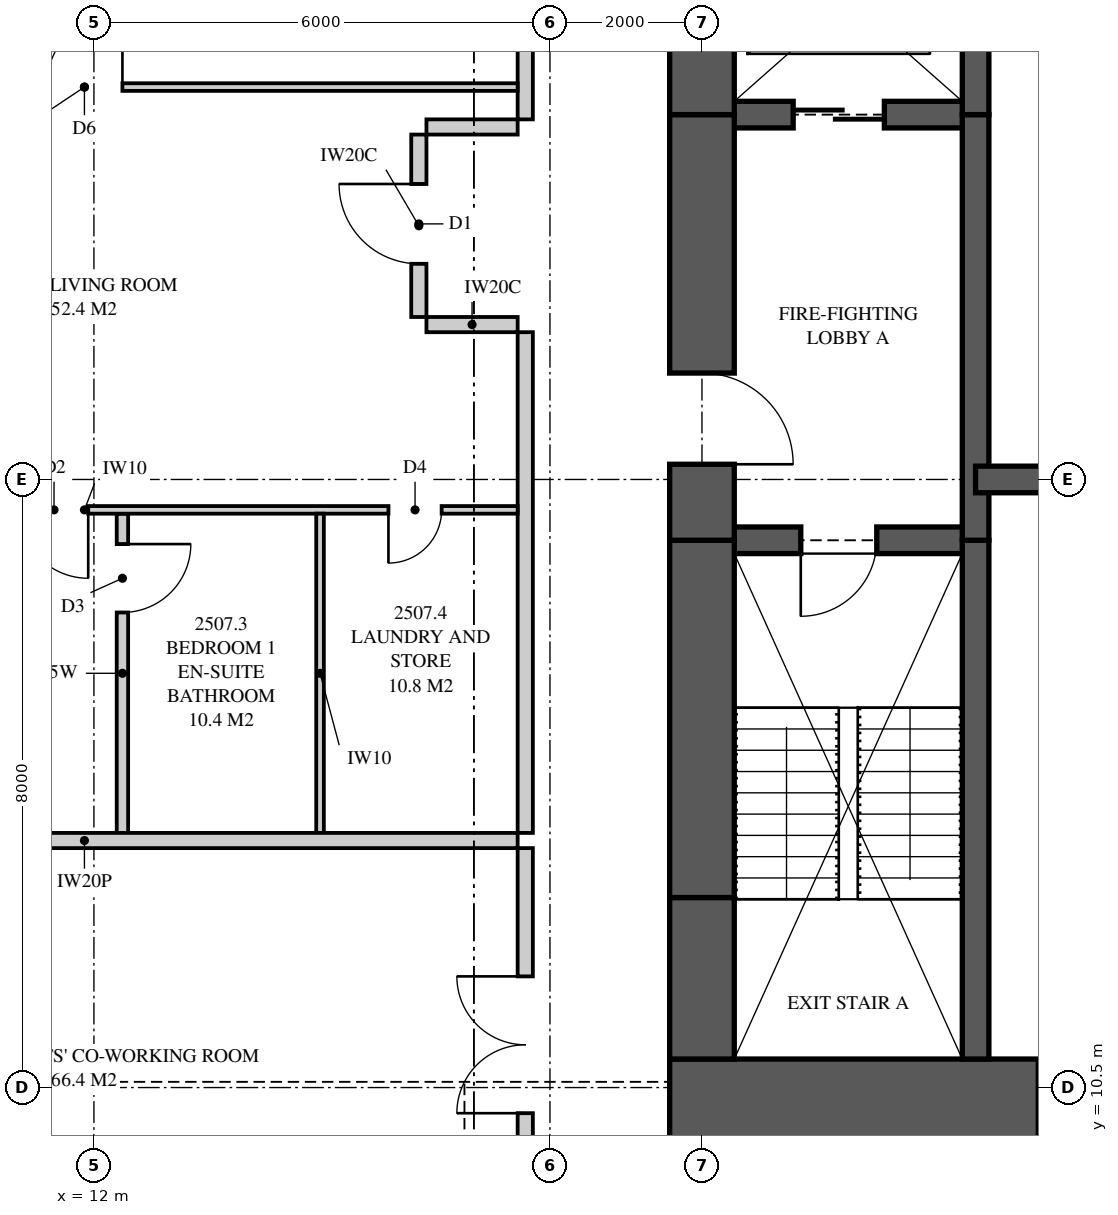
"""IFC4 building model, lengths in metres.
Left out: names, types, materials, properties, quantities, classifications, styles, units other than length and angle.
Written with IfcOpenShell. Run it as: python <this file> out.ifc"""

import sys

from ifc_helpers import new_model, si_unit, direction, frame, frame_2d, origin, place, context, subcontext, project, spatial, polyline, rectangle, outline, extrude, element, fill, save


model = new_model("IFC4")
c1 = context("Model", 3, precision=1e-05, world=origin(), true_north=direction((0.0, 1.0)))
c2 = subcontext(c1, "Body", "Model", "MODEL_VIEW")
j1 = project(units=[si_unit("LENGTHUNIT", "METRE"), si_unit("PLANEANGLEUNIT", "RADIAN")], contexts=[c1])
p1 = place(None, origin())
s1 = spatial("IfcSite", under=j1, at=p1, CompositionType="ELEMENT")
p2 = place(p1, origin())
s2 = spatial("IfcBuilding", under=s1, at=p2, CompositionType="ELEMENT")
p3 = place(p2, frame((0.0, 0.0, 94.8)))
s3 = spatial("IfcBuildingStorey", under=s2, at=p3, CompositionType="ELEMENT", Elevation=94.8)
p4 = place(p3, frame((19.575, 10.125, 0.0), z_axis=(0.0, 0.0, 1.0), x_axis=(1.0, 0.0, 0.0)))
e1 = element("IfcWall", 1, at=p4, inside=s3, PredefinedType="SHEAR", context=c2, shape_type="SweptSolid", body=[
    extrude(rectangle(XDim=6.425, YDim=1.5, at=frame_2d((3.212, 0.0))), origin(), (0.0, 0.0, 1.0), 3.35),
])
p5 = place(p4, frame((4.85, 0.0, 0.0)))
e2 = element("IfcOpeningElement", 2, at=p5, cuts=e1, PredefinedType="OPENING", context=c2, shape_type="SweptSolid", body=[
    extrude(rectangle(XDim=0.75, YDim=2.1, at=frame_2d((0.375, 1.05))), frame((0.0, 0.76, 0.0), z_axis=(0.0, -1.0, 0.0), x_axis=(1.0, 0.0, 0.0)), (0.0, 0.0, 1.0), 1.52),
])
p6 = place(p3, frame((20.0, 26.125, 0.0), z_axis=(0.0, 0.0, 1.0), x_axis=(0.0, -1.0, 0.0)))
e3 = element("IfcWall", 3, at=p6, inside=s3, PredefinedType="SHEAR", context=c2, shape_type="SweptSolid", body=[
    extrude(rectangle(XDim=2.825, YDim=0.85, at=frame_2d((1.413, 0.0))), origin(), (0.0, 0.0, 1.0), 3.35),
])
p7 = place(p3, frame((20.0, 23.3, 0.0), z_axis=(0.0, 0.0, 1.0), x_axis=(0.0, -1.0, 0.0)))
e4 = element("IfcWall", 4, at=p7, inside=s3, PredefinedType="SHEAR", context=c2, shape_type="SweptSolid", body=[
    extrude(rectangle(XDim=5.6, YDim=0.85, at=frame_2d((2.8, 0.0))), origin(), (0.0, 0.0, 1.0), 3.35),
])
p8 = place(p7, frame((3.4, 0.0, 0.0)))
e5 = element("IfcOpeningElement", 5, at=p8, cuts=e4, PredefinedType="OPENING", context=c2, shape_type="SweptSolid", body=[
    extrude(rectangle(XDim=1.2, YDim=2.2, at=frame_2d((0.6, 1.1))), frame((0.0, 0.435, 0.0), z_axis=(0.0, -1.0, 0.0), x_axis=(1.0, 0.0, 0.0)), (0.0, 0.0, 1.0), 0.87),
])
p9 = place(p3, frame((20.0, 17.7, 0.0), z_axis=(0.0, 0.0, 1.0), x_axis=(0.0, -1.0, 0.0)))
e6 = element("IfcWall", 6, at=p9, inside=s3, PredefinedType="SHEAR", context=c2, shape_type="SweptSolid", body=[
    extrude(rectangle(XDim=4.7, YDim=0.85, at=frame_2d((2.35, 0.0))), origin(), (0.0, 0.0, 1.0), 3.35),
])
p10 = place(p3, frame((20.0, 13.0, 0.0), z_axis=(0.0, 0.0, 1.0), x_axis=(0.0, -1.0, 0.0)))
e7 = element("IfcWall", 7, at=p10, inside=s3, PredefinedType="SHEAR", context=c2, shape_type="SweptSolid", body=[
    extrude(rectangle(XDim=2.125, YDim=0.85, at=frame_2d((1.062, 0.0))), origin(), (0.0, 0.0, 1.0), 3.35),
])
p11 = place(p3, frame((23.6, 10.875, 0.0), z_axis=(0.0, 0.0, 1.0), x_axis=(0.0, 1.0, 0.0)))
e8 = element("IfcWall", 8, at=p11, inside=s3, PredefinedType="SHEAR", context=c2, shape_type="SweptSolid", body=[
    extrude(rectangle(XDim=6.825, YDim=0.35, at=frame_2d((3.413, 0.0))), origin(), (0.0, 0.0, 1.0), 3.35),
])
p12 = place(p3, frame((23.6, 17.7, 0.0), z_axis=(0.0, 0.0, 1.0), x_axis=(0.0, 1.0, 0.0)))
e9 = element("IfcWall", 9, at=p12, inside=s3, PredefinedType="SHEAR", context=c2, shape_type="SweptSolid", body=[
    extrude(rectangle(XDim=5.6, YDim=0.35, at=frame_2d((2.8, 0.0))), origin(), (0.0, 0.0, 1.0), 3.35),
])
p13 = place(p3, frame((23.6, 23.3, 0.0), z_axis=(0.0, 0.0, 1.0), x_axis=(0.0, 1.0, 0.0)))
e10 = element("IfcWall", 10, at=p13, inside=s3, PredefinedType="SHEAR", context=c2, shape_type="SweptSolid", body=[
    extrude(rectangle(XDim=2.825, YDim=0.35, at=frame_2d((1.413, 0.0))), origin(), (0.0, 0.0, 1.0), 3.35),
])
p14 = place(p3, frame((20.0, 17.7, 0.0), z_axis=(0.0, 0.0, 1.0), x_axis=(1.0, 0.0, 0.0)))
e11 = element("IfcWall", 11, at=p14, inside=s3, PredefinedType="SHEAR", context=c2, shape_type="SweptSolid", body=[
    extrude(rectangle(XDim=3.6, YDim=0.35, at=frame_2d((1.8, 0.0))), origin(), (0.0, 0.0, 1.0), 3.35),
])
p15 = place(p14, frame((1.3, 0.0, 0.0)))
e12 = element("IfcOpeningElement", 12, at=p15, cuts=e11, PredefinedType="OPENING", context=c2, shape_type="SweptSolid", body=[
    extrude(rectangle(XDim=1.0, YDim=2.1, at=frame_2d((0.5, 1.05))), frame((0.0, 0.185, 0.0), z_axis=(0.0, -1.0, 0.0), x_axis=(1.0, 0.0, 0.0)), (0.0, 0.0, 1.0), 0.37),
])
p16 = place(p3, frame((20.0, 23.3, 0.0), z_axis=(0.0, 0.0, 1.0), x_axis=(1.0, 0.0, 0.0)))
e13 = element("IfcWall", 13, at=p16, inside=s3, PredefinedType="SHEAR", context=c2, shape_type="SweptSolid", body=[
    extrude(rectangle(XDim=3.6, YDim=0.35, at=frame_2d((1.8, 0.0))), origin(), (0.0, 0.0, 1.0), 3.35),
])
p17 = place(p16, frame((1.2, 0.0, 0.0)))
e14 = element("IfcOpeningElement", 14, at=p17, cuts=e13, PredefinedType="OPENING", context=c2, shape_type="SweptSolid", body=[
    extrude(rectangle(XDim=1.2, YDim=2.1, at=frame_2d((0.6, 1.05))), frame((0.0, 0.185, 0.0), z_axis=(0.0, -1.0, 0.0), x_axis=(1.0, 0.0, 0.0)), (0.0, 0.0, 1.0), 0.37),
])
p18 = place(p3, frame((23.6, 18.5, 0.0), z_axis=(0.0, 0.0, 1.0), x_axis=(1.0, 0.0, 0.0)))
e15 = element("IfcWall", 15, at=p18, inside=s3, PredefinedType="SHEAR", context=c2, shape_type="SweptSolid", body=[
    extrude(rectangle(XDim=2.4, YDim=0.35, at=frame_2d((1.2, 0.0))), origin(), (0.0, 0.0, 1.0), 3.35),
])
p19 = place(p3, frame((6.175, 13.75, 0.0), z_axis=(0.0, 0.0, 1.0), x_axis=(1.0, 0.0, 0.0)))
e16 = element("IfcWall", 16, at=p19, inside=s3, PredefinedType="PARTITIONING", context=c2, shape_type="SweptSolid", body=[
    extrude(outline(polyline([(1.685, 2.15), (0.0, 2.15), (0.0, 0.0), (11.4, 0.0), (11.4, 3.11), (5.335, 3.11), (5.335, 2.51), (2.715, 2.51), (2.715, 3.11), (1.685, 3.11), (1.685, 2.15)]), holes=[polyline([(1.021, 0.133), (0.529, 0.133), (0.529, 0.991), (1.021, 0.991), (1.021, 0.133)]), polyline([(1.021, 1.158), (0.529, 1.158), (0.529, 2.017), (1.021, 2.017), (1.021, 1.158)])]), frame((0.0, 0.1, 0.0), z_axis=(0.0, -1.0, 0.0), x_axis=(1.0, 0.0, 0.0)), (0.0, 0.0, 1.0), 0.2),
])
p20 = place(p3, frame((17.675, 7.825, 0.0), z_axis=(0.0, 0.0, 1.0), x_axis=(0.0, 1.0, 0.0)))
e17 = element("IfcWall", 17, at=p20, inside=s3, PredefinedType="PARTITIONING", context=c2, shape_type="SweptSolid", body=[
    extrude(outline(polyline([(0.0, 0.0), (5.825, 0.0), (5.825, 3.11), (3.087, 3.11), (3.087, 2.541), (2.413, 2.541), (2.413, 3.11), (0.0, 3.11), (0.0, 0.0)])), frame((0.0, 0.1, 0.0), z_axis=(0.0, -1.0, 0.0), x_axis=(1.0, 0.0, 0.0)), (0.0, 0.0, 1.0), 0.2),
])
p21 = place(p20, frame((2.337, 0.0, 0.0)))
e18 = element("IfcOpeningElement", 18, at=p21, cuts=e17, PredefinedType="OPENING", context=c2, shape_type="SweptSolid", body=[
    extrude(rectangle(XDim=1.8, YDim=2.1, at=frame_2d((0.9, 1.05))), frame((0.0, 0.11, 0.0), z_axis=(0.0, -1.0, 0.0), x_axis=(1.0, 0.0, 0.0)), (0.0, 0.0, 1.0), 0.22),
])
p22 = place(p3, frame((17.675, 13.85, 0.0), z_axis=(0.0, 0.0, 1.0), x_axis=(0.0, 1.0, 0.0)))
e19 = element("IfcWall", 19, at=p22, inside=s3, PredefinedType="PARTITIONING", context=c2, shape_type="SweptSolid", body=[
    extrude(rectangle(XDim=6.587, YDim=0.2, at=frame_2d((3.294, 0.0))), origin(), (0.0, 0.0, 1.0), 3.11),
])
p23 = place(p3, frame((6.175, 18.1, 0.0), z_axis=(0.0, 0.0, 1.0), x_axis=(1.0, 0.0, 0.0)))
e20 = element("IfcWall", 20, at=p23, inside=s3, PredefinedType="PARTITIONING", context=c2, shape_type="SweptSolid", body=[
    extrude(outline(polyline([(0.0, 0.0), (11.4, 0.0), (11.4, 3.11), (5.285, 3.11), (5.285, 2.51), (2.765, 2.51), (2.765, 3.11), (1.635, 3.11), (1.635, 2.15), (0.0, 2.15), (0.0, 3.11), (0.0, 0.0)])), frame((0.0, 0.05, 0.0), z_axis=(0.0, -1.0, 0.0), x_axis=(1.0, 0.0, 0.0)), (0.0, 0.0, 1.0), 0.1),
])
p24 = place(p23, frame((4.85, 0.0, 0.0)))
e21 = element("IfcOpeningElement", 21, at=p24, cuts=e20, PredefinedType="OPENING", context=c2, shape_type="SweptSolid", body=[
    extrude(rectangle(XDim=0.9, YDim=2.1, at=frame_2d((0.45, 1.05))), frame((0.0, 0.06, 0.0), z_axis=(0.0, -1.0, 0.0), x_axis=(1.0, 0.0, 0.0)), (0.0, 0.0, 1.0), 0.12),
])
p25 = place(p23, frame((9.7, 0.0, 0.0)))
e22 = element("IfcOpeningElement", 22, at=p25, cuts=e20, PredefinedType="OPENING", context=c2, shape_type="SweptSolid", body=[
    extrude(rectangle(XDim=0.7, YDim=2.1, at=frame_2d((0.35, 1.05))), frame((0.0, 0.06, 0.0), z_axis=(0.0, -1.0, 0.0), x_axis=(1.0, 0.0, 0.0)), (0.0, 0.0, 1.0), 0.12),
])
p26 = place(p3, frame((12.375, 13.85, 0.0), z_axis=(0.0, 0.0, 1.0), x_axis=(0.0, 1.0, 0.0)))
e23 = element("IfcWall", 23, at=p26, inside=s3, PredefinedType="PLUMBINGWALL", context=c2, shape_type="SweptSolid", body=[
    extrude(rectangle(XDim=4.2, YDim=0.15, at=frame_2d((2.1, 0.0))), origin(), (0.0, 0.0, 1.0), 3.11),
])
p27 = place(p26, frame((2.9, 0.0, 0.0)))
e24 = element("IfcOpeningElement", 24, at=p27, cuts=e23, PredefinedType="OPENING", context=c2, shape_type="SweptSolid", body=[
    extrude(rectangle(XDim=0.9, YDim=2.1, at=frame_2d((0.45, 1.05))), frame((0.0, 0.085, 0.0), z_axis=(0.0, -1.0, 0.0), x_axis=(1.0, 0.0, 0.0)), (0.0, 0.0, 1.0), 0.17),
])
p28 = place(p3, frame((14.975, 13.85, 0.0), z_axis=(0.0, 0.0, 1.0), x_axis=(0.0, 1.0, 0.0)))
e25 = element("IfcWall", 25, at=p28, inside=s3, PredefinedType="PARTITIONING", context=c2, shape_type="SweptSolid", body=[
    extrude(rectangle(XDim=4.2, YDim=0.1, at=frame_2d((2.1, 0.0))), origin(), (0.0, 0.0, 1.0), 3.11),
])
p29 = place(p3, frame((6.175, 23.663, 0.0), z_axis=(0.0, 0.0, 1.0), x_axis=(1.0, 0.0, 0.0)))
e26 = element("IfcWall", 26, at=p29, inside=s3, PredefinedType="PARTITIONING", context=c2, shape_type="SweptSolid", body=[
    extrude(outline(polyline([(0.529, 2.15), (0.0, 2.15), (0.0, 0.0), (0.529, 0.0), (0.529, 0.555), (1.021, 0.555), (1.021, 0.0), (11.4, 0.0), (11.4, 3.11), (5.285, 3.11), (5.285, 2.51), (2.765, 2.51), (2.765, 3.11), (1.635, 3.11), (1.635, 2.15), (1.021, 2.15), (1.021, 1.594), (0.529, 1.594), (0.529, 2.15)])), frame((0.0, 0.05, 0.0), z_axis=(0.0, -1.0, 0.0), x_axis=(1.0, 0.0, 0.0)), (0.0, 0.0, 1.0), 0.1),
])
p30 = place(p29, frame((5.2, 0.0, 0.0)))
e27 = element("IfcOpeningElement", 27, at=p30, cuts=e26, PredefinedType="OPENING", context=c2, shape_type="SweptSolid", body=[
    extrude(rectangle(XDim=1.0, YDim=2.1, at=frame_2d((0.5, 1.05))), frame((0.0, 0.06, 0.0), z_axis=(0.0, -1.0, 0.0), x_axis=(1.0, 0.0, 0.0)), (0.0, 0.0, 1.0), 0.12),
])
p31 = place(p3, frame((17.675, 23.238, 0.0), z_axis=(0.0, 0.0, 1.0), x_axis=(0.0, 1.0, 0.0)))
e28 = element("IfcWall", 28, at=p31, inside=s3, PredefinedType="PARTITIONING", context=c2, shape_type="SweptSolid", body=[
    extrude(outline(polyline([(0.0, 0.0), (5.938, 0.0), (5.938, 3.11), (3.525, 3.11), (3.525, 2.541), (2.85, 2.541), (2.85, 3.11), (0.0, 3.11), (0.0, 0.0)])), frame((0.0, 0.1, 0.0), z_axis=(0.0, -1.0, 0.0), x_axis=(1.0, 0.0, 0.0)), (0.0, 0.0, 1.0), 0.2),
])
p32 = place(p3, frame((16.275, 20.637, 0.0), z_axis=(0.0, 0.0, 1.0), x_axis=(0.0, 1.0, 0.0)))
e29 = element("IfcWall", 29, at=p32, inside=s3, PredefinedType="PARTITIONING", context=c2, shape_type="SweptSolid", body=[
    extrude(rectangle(XDim=2.4, YDim=0.2, at=frame_2d((1.2, 0.0))), origin(), (0.0, 0.0, 1.0), 3.11),
])
p33 = place(p32, frame((0.7, 0.0, 0.0)))
e30 = element("IfcOpeningElement", 30, at=p33, cuts=e29, PredefinedType="OPENING", context=c2, shape_type="SweptSolid", body=[
    extrude(rectangle(XDim=1.05, YDim=2.2, at=frame_2d((0.525, 1.1))), frame((0.0, 0.11, 0.0), z_axis=(0.0, -1.0, 0.0), x_axis=(1.0, 0.0, 0.0)), (0.0, 0.0, 1.0), 0.22),
])
for number, where, z_axis, x_axis in (
    (31, (17.575, 20.538, 0.0), (0.0, 0.0, 1.0), (-1.0, 0.0, 0.0)),
    (32, (17.575, 23.137, 0.0), (0.0, 0.0, 1.0), (-1.0, 0.0, 0.0)),
):
    element("IfcWall", number, at=place(p3, frame(where, z_axis=z_axis, x_axis=x_axis)), inside=s3, PredefinedType="PARTITIONING", context=c2, shape_type="SweptSolid", body=[
        extrude(rectangle(XDim=1.2, YDim=0.2, at=frame_2d((0.6, 0.0))), origin(), (0.0, 0.0, 1.0), 3.11),
    ])
p34 = place(p21, origin())
e33 = element("IfcDoor", 33, at=p34, inside=s3, OperationType="DOUBLE_DOOR_SINGLE_SWING", PredefinedType="DOOR", context=c2, shape_type="SweptSolid", body=[
    extrude(rectangle(XDim=1.8, YDim=2.1, at=frame_2d((0.9, 1.05))), frame((0.0, 0.025, 0.0), z_axis=(0.0, -1.0, 0.0), x_axis=(1.0, 0.0, 0.0)), (0.0, 0.0, 1.0), 0.05),
])
fill(e18, e33)
p35 = place(p33, origin())
e34 = element("IfcDoor", 34, at=p35, inside=s3, OperationType="SINGLE_SWING_RIGHT", PredefinedType="DOOR", context=c2, shape_type="SweptSolid", body=[
    extrude(rectangle(XDim=1.05, YDim=2.2, at=frame_2d((0.525, 1.1))), frame((0.0, 0.025, 0.0), z_axis=(0.0, -1.0, 0.0), x_axis=(1.0, 0.0, 0.0)), (0.0, 0.0, 1.0), 0.05),
])
fill(e30, e34)
p36 = place(p24, frame((0.9, 0.0, 0.0), z_axis=(0.0, 0.0, 1.0), x_axis=(-1.0, 0.0, 0.0)))
e35 = element("IfcDoor", 35, at=p36, inside=s3, OperationType="SINGLE_SWING_LEFT", PredefinedType="DOOR", context=c2, shape_type="SweptSolid", body=[
    extrude(rectangle(XDim=0.9, YDim=2.1, at=frame_2d((0.45, 1.05))), frame((0.0, 0.025, 0.0), z_axis=(0.0, -1.0, 0.0), x_axis=(1.0, 0.0, 0.0)), (0.0, 0.0, 1.0), 0.05),
])
fill(e21, e35)
p37 = place(p27, frame((0.9, 0.0, 0.0), z_axis=(0.0, 0.0, 1.0), x_axis=(-1.0, 0.0, 0.0)))
e36 = element("IfcDoor", 36, at=p37, inside=s3, OperationType="SINGLE_SWING_LEFT", PredefinedType="DOOR", context=c2, shape_type="SweptSolid", body=[
    extrude(rectangle(XDim=0.9, YDim=2.1, at=frame_2d((0.45, 1.05))), frame((0.0, 0.025, 0.0), z_axis=(0.0, -1.0, 0.0), x_axis=(1.0, 0.0, 0.0)), (0.0, 0.0, 1.0), 0.05),
])
fill(e24, e36)
p38 = place(p25, frame((0.7, 0.0, 0.0), z_axis=(0.0, 0.0, 1.0), x_axis=(-1.0, 0.0, 0.0)))
e37 = element("IfcDoor", 37, at=p38, inside=s3, OperationType="SINGLE_SWING_RIGHT", PredefinedType="DOOR", context=c2, shape_type="SweptSolid", body=[
    extrude(rectangle(XDim=0.7, YDim=2.1, at=frame_2d((0.35, 1.05))), frame((0.0, 0.025, 0.0), z_axis=(0.0, -1.0, 0.0), x_axis=(1.0, 0.0, 0.0)), (0.0, 0.0, 1.0), 0.05),
])
fill(e22, e37)
p39 = place(p30, origin())
e38 = element("IfcDoor", 38, at=p39, inside=s3, OperationType="SINGLE_SWING_RIGHT", PredefinedType="DOOR", context=c2, shape_type="SweptSolid", body=[
    extrude(rectangle(XDim=1.0, YDim=2.1, at=frame_2d((0.5, 1.05))), frame((0.0, 0.025, 0.0), z_axis=(0.0, -1.0, 0.0), x_axis=(1.0, 0.0, 0.0)), (0.0, 0.0, 1.0), 0.05),
])
fill(e27, e38)
p40 = place(p15, frame((1.0, 0.0, 0.0), z_axis=(0.0, 0.0, 1.0), x_axis=(-1.0, 0.0, 0.0)))
e39 = element("IfcDoor", 39, at=p40, inside=s3, OperationType="SINGLE_SWING_RIGHT", PredefinedType="DOOR", context=c2, shape_type="SweptSolid", body=[
    extrude(rectangle(XDim=1.0, YDim=2.1, at=frame_2d((0.5, 1.05))), frame((0.0, 0.025, 0.0), z_axis=(0.0, -1.0, 0.0), x_axis=(1.0, 0.0, 0.0)), (0.0, 0.0, 1.0), 0.05),
])
fill(e12, e39)
p41 = place(p8, origin())
e40 = element("IfcDoor", 40, at=p41, inside=s3, OperationType="SINGLE_SWING_RIGHT", PredefinedType="DOOR", context=c2, shape_type="SweptSolid", body=[
    extrude(rectangle(XDim=1.2, YDim=2.2, at=frame_2d((0.6, 1.1))), frame((0.0, 0.025, 0.0), z_axis=(0.0, -1.0, 0.0), x_axis=(1.0, 0.0, 0.0)), (0.0, 0.0, 1.0), 0.05),
])
fill(e5, e40)
p42 = place(p17, origin())
e41 = element("IfcDoor", 41, at=p42, inside=s3, OperationType="SLIDING_TO_LEFT", PredefinedType="DOOR", context=c2, shape_type="SweptSolid", body=[
    extrude(rectangle(XDim=1.2, YDim=2.1, at=frame_2d((0.6, 1.05))), frame((0.0, 0.025, 0.0), z_axis=(0.0, -1.0, 0.0), x_axis=(1.0, 0.0, 0.0)), (0.0, 0.0, 1.0), 0.05),
])
fill(e14, e41)
save(model, sys.argv[1])
